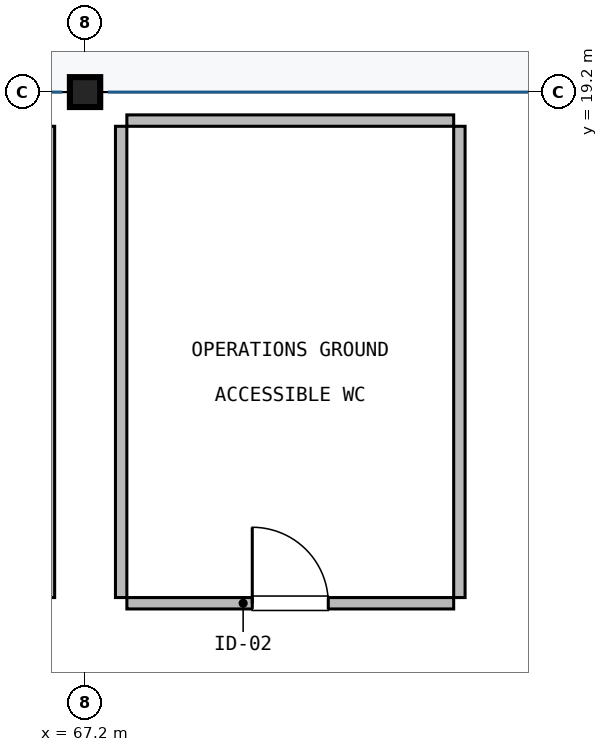
"""IFC4 building model, lengths in metres.
Left out: names, types, materials, properties, quantities, classifications, styles, units other than length and angle.
Written with IfcOpenShell. Run it as: python <this file> out.ifc"""

import sys

from ifc_helpers import new_model, si_unit, direction, frame, frame_2d, origin, origin_2d, place, context, subcontext, project, spatial, rectangle, i_section, extrude, element, fill, save


model = new_model("IFC4")
c1 = context("Model", 3, precision=1e-05, world=origin(), true_north=direction((0.0, 1.0)))
c2 = subcontext(c1, "Body", "Model", "MODEL_VIEW")
j1 = project(units=[si_unit("LENGTHUNIT", "METRE"), si_unit("PLANEANGLEUNIT", "RADIAN")], contexts=[c1])
p1 = place(None, origin())
s1 = spatial("IfcSite", under=j1, at=p1, CompositionType="ELEMENT")
p2 = place(p1, origin())
s2 = spatial("IfcBuilding", under=s1, at=p2, CompositionType="ELEMENT")
p3 = place(p2, origin())
s3 = spatial("IfcBuildingStorey", under=s2, at=p3, CompositionType="ELEMENT", Elevation=0.0)
p4 = place(p3, frame((67.2, 19.2, -0.36), z_axis=(0.0, 0.0, 1.0), x_axis=(1.0, 0.0, 0.0)))
e1 = element("IfcColumn", 1, at=p4, inside=s3, PredefinedType="COLUMN", context=c2, shape_type="SweptSolid", body=[
    extrude(i_section(OverallWidth=0.399, OverallDepth=0.394, WebThickness=0.023, FlangeThickness=0.037, FilletRadius=0.015, at=origin_2d()), origin(), (0.0, 0.0, 1.0), 6.11),
])
p5 = place(p3, frame((66.725, 18.75, 0.0), z_axis=(0.0, 0.0, 1.0), x_axis=(0.0, -1.0, 0.0)))
e2 = element("IfcWall", 2, at=p5, inside=s3, PredefinedType="PLUMBINGWALL", context=c2, shape_type="SweptSolid", body=[
    extrude(rectangle(XDim=6.2, YDim=0.15, at=frame_2d((3.1, 0.0))), origin(), (0.0, 0.0, 1.0), 5.39),
])
p6 = place(p3, frame((72.05, 12.475, 0.0), z_axis=(0.0, 0.0, 1.0), x_axis=(-1.0, 0.0, 0.0)))
e3 = element("IfcWall", 3, at=p6, inside=s3, PredefinedType="PLUMBINGWALL", context=c2, shape_type="SweptSolid", body=[
    extrude(rectangle(XDim=4.3, YDim=0.15, at=frame_2d((2.15, 0.0))), origin(), (0.0, 0.0, 1.0), 5.39),
])
p7 = place(p6, frame((1.65, 0.0, 0.0)))
e4 = element("IfcOpeningElement", 4, at=p7, cuts=e3, PredefinedType="OPENING", context=c2, shape_type="SweptSolid", body=[
    extrude(rectangle(XDim=1.0, YDim=2.15, at=frame_2d((0.5, 1.075))), frame((0.0, 0.085, 0.0), z_axis=(0.0, -1.0, 0.0), x_axis=(1.0, 0.0, 0.0)), (0.0, 0.0, 1.0), 0.17),
])
p8 = place(p3, frame((67.75, 18.825, 0.0), z_axis=(0.0, 0.0, 1.0), x_axis=(1.0, 0.0, 0.0)))
e5 = element("IfcWall", 5, at=p8, inside=s3, PredefinedType="PLUMBINGWALL", context=c2, shape_type="SweptSolid", body=[
    extrude(rectangle(XDim=4.3, YDim=0.15, at=frame_2d((2.15, 0.0))), origin(), (0.0, 0.0, 1.0), 5.39),
])
for number, where, z_axis, x_axis in (
    (6, (67.675, 12.55, 0.0), (0.0, 0.0, 1.0), (0.0, 1.0, 0.0)),
    (7, (72.125, 18.75, 0.0), (0.0, 0.0, 1.0), (0.0, -1.0, 0.0)),
):
    element("IfcWall", number, at=place(p3, frame(where, z_axis=z_axis, x_axis=x_axis)), inside=s3, PredefinedType="PLUMBINGWALL", context=c2, shape_type="SweptSolid", body=[
        extrude(rectangle(XDim=6.2, YDim=0.15, at=frame_2d((3.1, 0.0))), origin(), (0.0, 0.0, 1.0), 5.39),
    ])
p9 = place(p7, frame((1.0, 0.0, 0.0), z_axis=(0.0, 0.0, 1.0), x_axis=(-1.0, 0.0, 0.0)))
e8 = element("IfcDoor", 8, at=p9, inside=s3, OperationType="SINGLE_SWING_RIGHT", PredefinedType="DOOR", context=c2, shape_type="SweptSolid", body=[
    extrude(rectangle(XDim=1.0, YDim=2.15, at=frame_2d((0.5, 1.075))), frame((0.0, 0.025, 0.0), z_axis=(0.0, -1.0, 0.0), x_axis=(1.0, 0.0, 0.0)), (0.0, 0.0, 1.0), 0.05),
])
fill(e4, e8)
save(model, sys.argv[1])
